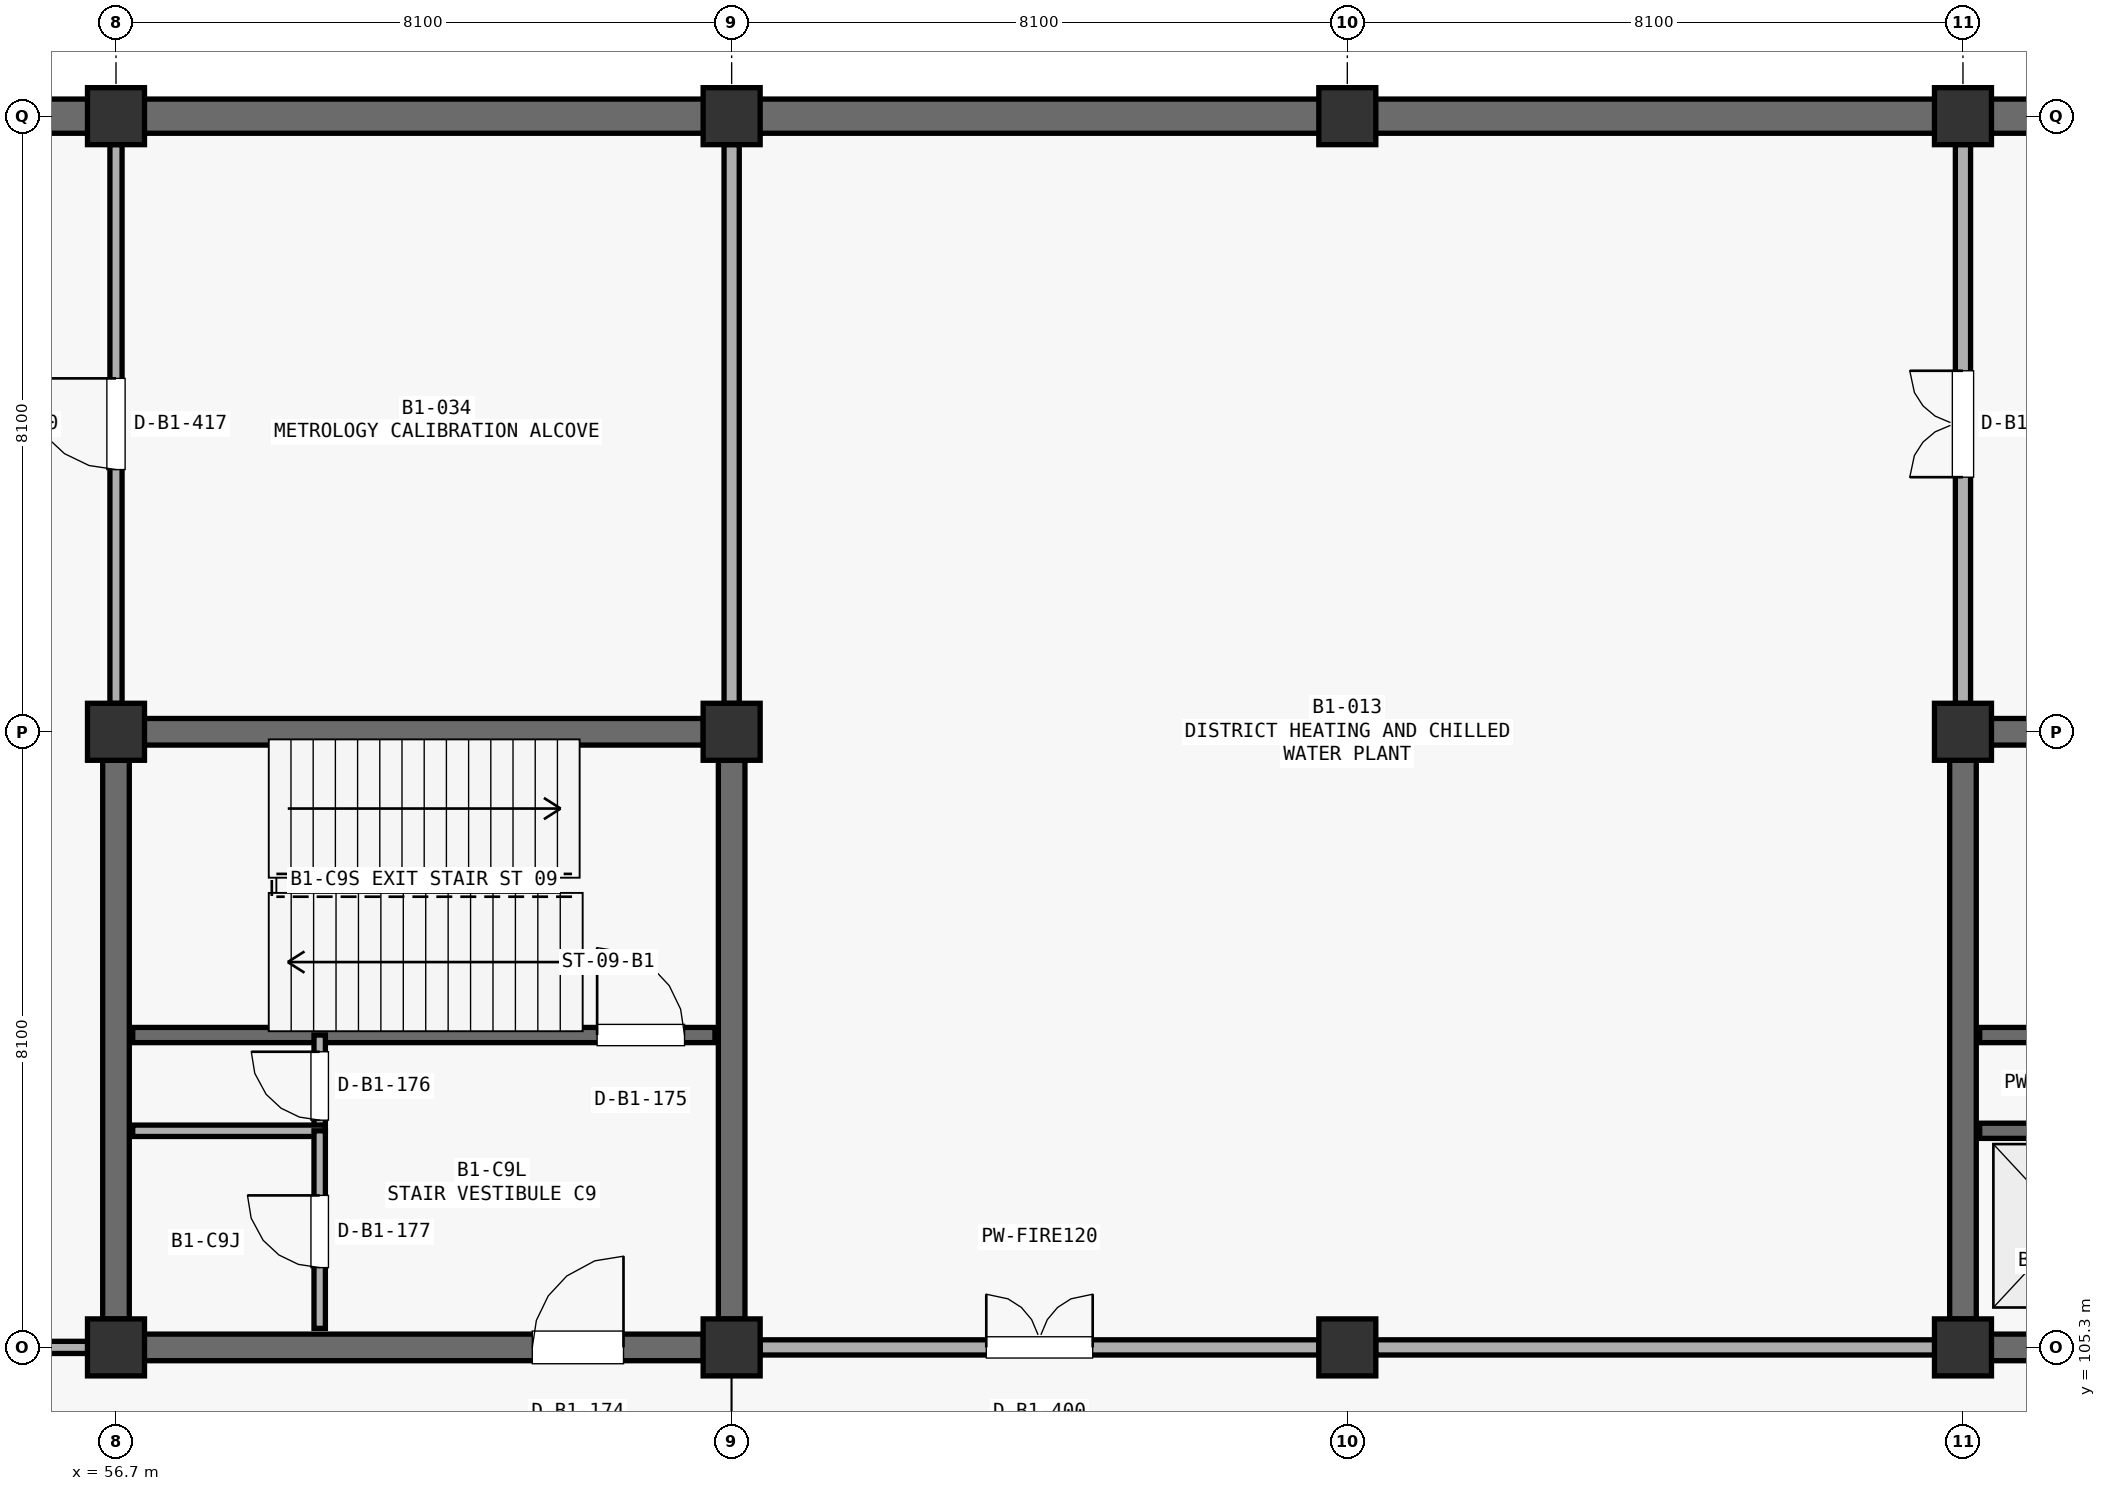
"""IFC4 building model, lengths in metres.
Left out: names, types, materials, properties, quantities, classifications, styles, units other than length and angle.
Written with IfcOpenShell. Run it as: python <this file> out.ifc"""

import sys

from ifc_helpers import new_model, si_unit, direction, frame, frame_2d, origin, origin_2d, place, context, subcontext, project, spatial, rectangle, extrude, element, fill, save


model = new_model("IFC4")
c1 = context("Model", 3, precision=1e-05, world=origin(), true_north=direction((0.0, 1.0)))
c2 = subcontext(c1, "Body", "Model", "MODEL_VIEW")
j1 = project(units=[si_unit("LENGTHUNIT", "METRE"), si_unit("PLANEANGLEUNIT", "RADIAN")], contexts=[c1])
p1 = place(None, origin())
s1 = spatial("IfcSite", under=j1, at=p1, CompositionType="ELEMENT")
p2 = place(p1, origin())
s2 = spatial("IfcBuilding", under=s1, at=p2, CompositionType="ELEMENT")
p3 = place(p2, frame((0.0, 0.0, -5.1)))
s3 = spatial("IfcBuildingStorey", under=s2, at=p3, CompositionType="ELEMENT", Elevation=-5.1)
for number, where, z_axis, x_axis in (
    (1, (56.7, 105.3, 0.0), (0.0, 0.0, 1.0), (1.0, 0.0, 0.0)),
    (2, (56.7, 113.4, 0.0), (0.0, 0.0, 1.0), (1.0, 0.0, 0.0)),
    (3, (56.7, 121.5, 0.0), (0.0, 0.0, 1.0), (1.0, 0.0, 0.0)),
    (4, (64.8, 105.3, 0.0), (0.0, 0.0, 1.0), (1.0, 0.0, 0.0)),
    (5, (64.8, 113.4, 0.0), (0.0, 0.0, 1.0), (1.0, 0.0, 0.0)),
    (6, (64.8, 121.5, 0.0), (0.0, 0.0, 1.0), (1.0, 0.0, 0.0)),
    (7, (72.9, 105.3, 0.0), (0.0, 0.0, 1.0), (1.0, 0.0, 0.0)),
    (8, (72.9, 113.4, 0.0), (0.0, 0.0, 1.0), (1.0, 0.0, 0.0)),
    (9, (72.9, 121.5, 0.0), (0.0, 0.0, 1.0), (1.0, 0.0, 0.0)),
    (10, (81.0, 105.3, 0.0), (0.0, 0.0, 1.0), (1.0, 0.0, 0.0)),
    (11, (81.0, 113.4, 0.0), (0.0, 0.0, 1.0), (1.0, 0.0, 0.0)),
    (12, (81.0, 121.5, 0.0), (0.0, 0.0, 1.0), (1.0, 0.0, 0.0)),
):
    element("IfcColumn", number, at=place(p3, frame(where, z_axis=z_axis, x_axis=x_axis)), inside=s3, PredefinedType="COLUMN", context=c2, shape_type="SweptSolid", body=[
        extrude(rectangle(XDim=0.75, YDim=0.75, at=origin_2d()), origin(), (0.0, 0.0, 1.0), 5.1),
    ])
p4 = place(p3, frame((48.96, 121.5, 0.0), z_axis=(0.0, 0.0, 1.0), x_axis=(1.0, 0.0, 0.0)))
e13 = element("IfcWall", 13, at=p4, inside=s3, PredefinedType="SOLIDWALL", context=c2, shape_type="SweptSolid", body=[
    extrude(rectangle(XDim=7.38, YDim=0.45, at=frame_2d((3.69, 0.0))), origin(), (0.0, 0.0, 1.0), 4.365),
])
p5 = place(p3, frame((57.06, 121.5, 0.0), z_axis=(0.0, 0.0, 1.0), x_axis=(1.0, 0.0, 0.0)))
e14 = element("IfcWall", 14, at=p5, inside=s3, PredefinedType="SOLIDWALL", context=c2, shape_type="SweptSolid", body=[
    extrude(rectangle(XDim=7.38, YDim=0.45, at=frame_2d((3.69, 0.0))), origin(), (0.0, 0.0, 1.0), 4.18),
])
p6 = place(p3, frame((65.16, 121.5, 0.0), z_axis=(0.0, 0.0, 1.0), x_axis=(1.0, 0.0, 0.0)))
e15 = element("IfcWall", 15, at=p6, inside=s3, PredefinedType="SOLIDWALL", context=c2, shape_type="SweptSolid", body=[
    extrude(rectangle(XDim=7.38, YDim=0.45, at=frame_2d((3.69, 0.0))), origin(), (0.0, 0.0, 1.0), 3.93),
])
p7 = place(p3, frame((73.26, 121.5, 0.0), z_axis=(0.0, 0.0, 1.0), x_axis=(1.0, 0.0, 0.0)))
e16 = element("IfcWall", 16, at=p7, inside=s3, PredefinedType="SOLIDWALL", context=c2, shape_type="SweptSolid", body=[
    extrude(rectangle(XDim=7.38, YDim=0.45, at=frame_2d((3.69, 0.0))), origin(), (0.0, 0.0, 1.0), 4.365),
])
p8 = place(p3, frame((81.36, 121.5, 0.0), z_axis=(0.0, 0.0, 1.0), x_axis=(1.0, 0.0, 0.0)))
e17 = element("IfcWall", 17, at=p8, inside=s3, PredefinedType="SOLIDWALL", context=c2, shape_type="SweptSolid", body=[
    extrude(rectangle(XDim=7.38, YDim=0.45, at=frame_2d((3.69, 0.0))), origin(), (0.0, 0.0, 1.0), 4.03),
])
for number, where, z_axis, x_axis in (
    (18, (81.373, 113.4, 0.0), (0.0, 0.0, 1.0), (1.0, 0.0, 0.0)),
    (19, (81.0, 105.673, 0.0), (0.0, 0.0, 1.0), (0.0, 1.0, 0.0)),
):
    element("IfcWall", number, at=place(p3, frame(where, z_axis=z_axis, x_axis=x_axis)), inside=s3, PredefinedType="SHEAR", context=c2, shape_type="SweptSolid", body=[
        extrude(rectangle(XDim=7.354, YDim=0.35, at=frame_2d((3.677, 0.0))), origin(), (0.0, 0.0, 1.0), 4.782),
    ])
p9 = place(p3, frame((81.373, 105.3, 0.0), z_axis=(0.0, 0.0, 1.0), x_axis=(1.0, 0.0, 0.0)))
e20 = element("IfcWall", 20, at=p9, inside=s3, PredefinedType="SHEAR", context=c2, shape_type="SweptSolid", body=[
    extrude(rectangle(XDim=7.354, YDim=0.35, at=frame_2d((3.677, 0.0))), origin(), (0.0, 0.0, 1.0), 4.782),
])
p10 = place(p9, frame((5.104, 0.0, 0.0)))
e21 = element("IfcOpeningElement", 21, at=p10, cuts=e20, PredefinedType="OPENING", context=c2, shape_type="SweptSolid", body=[
    extrude(rectangle(XDim=1.2, YDim=2.2, at=frame_2d((0.6, 1.1))), frame((0.0, 0.185, 0.0), z_axis=(0.0, -1.0, 0.0), x_axis=(1.0, 0.0, 0.0)), (0.0, 0.0, 1.0), 0.37),
])
p11 = place(p3, frame((81.22, 109.41, 0.0), z_axis=(0.0, 0.0, 1.0), x_axis=(1.0, 0.0, 0.0)))
e22 = element("IfcWall", 22, at=p11, inside=s3, PredefinedType="SHEAR", context=c2, shape_type="SweptSolid", body=[
    extrude(rectangle(XDim=7.66, YDim=0.2, at=frame_2d((3.83, 0.0))), origin(), (0.0, 0.0, 1.0), 4.782),
])
p12 = place(p11, frame((6.11, 0.0, 0.0)))
e23 = element("IfcOpeningElement", 23, at=p12, cuts=e22, PredefinedType="OPENING", context=c2, shape_type="SweptSolid", body=[
    extrude(rectangle(XDim=1.15, YDim=2.2, at=frame_2d((0.575, 1.1))), frame((0.0, 0.11, 0.0), z_axis=(0.0, -1.0, 0.0), x_axis=(1.0, 0.0, 0.0)), (0.0, 0.0, 1.0), 0.22),
])
p13 = place(p3, frame((81.22, 108.15, 0.0), z_axis=(0.0, 0.0, 1.0), x_axis=(1.0, 0.0, 0.0)))
e24 = element("IfcWall", 24, at=p13, inside=s3, PredefinedType="SHEAR", context=c2, shape_type="SweptSolid", body=[
    extrude(rectangle(XDim=2.56, YDim=0.2, at=frame_2d((1.28, 0.0))), origin(), (0.0, 0.0, 1.0), 4.782),
])
for number, where, z_axis, x_axis in (
    (25, (57.073, 113.4, 0.0), (0.0, 0.0, 1.0), (1.0, 0.0, 0.0)),
    (26, (56.7, 105.673, 0.0), (0.0, 0.0, 1.0), (0.0, 1.0, 0.0)),
    (27, (64.8, 105.673, 0.0), (0.0, 0.0, 1.0), (0.0, 1.0, 0.0)),
):
    element("IfcWall", number, at=place(p3, frame(where, z_axis=z_axis, x_axis=x_axis)), inside=s3, PredefinedType="SHEAR", context=c2, shape_type="SweptSolid", body=[
        extrude(rectangle(XDim=7.354, YDim=0.35, at=frame_2d((3.677, 0.0))), origin(), (0.0, 0.0, 1.0), 4.782),
    ])
p14 = place(p3, frame((57.073, 105.3, 0.0), z_axis=(0.0, 0.0, 1.0), x_axis=(1.0, 0.0, 0.0)))
e28 = element("IfcWall", 28, at=p14, inside=s3, PredefinedType="SHEAR", context=c2, shape_type="SweptSolid", body=[
    extrude(rectangle(XDim=7.354, YDim=0.35, at=frame_2d((3.677, 0.0))), origin(), (0.0, 0.0, 1.0), 4.782),
])
p15 = place(p14, frame((5.104, 0.0, 0.0)))
e29 = element("IfcOpeningElement", 29, at=p15, cuts=e28, PredefinedType="OPENING", context=c2, shape_type="SweptSolid", body=[
    extrude(rectangle(XDim=1.2, YDim=2.2, at=frame_2d((0.6, 1.1))), frame((0.0, 0.185, 0.0), z_axis=(0.0, -1.0, 0.0), x_axis=(1.0, 0.0, 0.0)), (0.0, 0.0, 1.0), 0.37),
])
p16 = place(p3, frame((56.92, 109.41, 0.0), z_axis=(0.0, 0.0, 1.0), x_axis=(1.0, 0.0, 0.0)))
e30 = element("IfcWall", 30, at=p16, inside=s3, PredefinedType="SHEAR", context=c2, shape_type="SweptSolid", body=[
    extrude(rectangle(XDim=7.66, YDim=0.2, at=frame_2d((3.83, 0.0))), origin(), (0.0, 0.0, 1.0), 4.782),
])
p17 = place(p16, frame((6.11, 0.0, 0.0)))
e31 = element("IfcOpeningElement", 31, at=p17, cuts=e30, PredefinedType="OPENING", context=c2, shape_type="SweptSolid", body=[
    extrude(rectangle(XDim=1.15, YDim=2.2, at=frame_2d((0.575, 1.1))), frame((0.0, 0.11, 0.0), z_axis=(0.0, -1.0, 0.0), x_axis=(1.0, 0.0, 0.0)), (0.0, 0.0, 1.0), 0.22),
])
p18 = place(p3, frame((59.38, 108.15, 0.0), z_axis=(0.0, 0.0, 1.0), x_axis=(0.0, 1.0, 0.0)))
e32 = element("IfcWall", 32, at=p18, inside=s3, PredefinedType="PARTITIONING", context=c2, shape_type="SweptSolid", body=[
    extrude(rectangle(XDim=1.26, YDim=0.15, at=frame_2d((0.63, 0.0))), origin(), (0.0, 0.0, 1.0), 4.782),
])
p19 = place(p18, frame((0.14, 0.0, 0.0)))
e33 = element("IfcOpeningElement", 33, at=p19, cuts=e32, PredefinedType="OPENING", context=c2, shape_type="SweptSolid", body=[
    extrude(rectangle(XDim=0.9, YDim=2.15, at=frame_2d((0.45, 1.075))), frame((0.0, 0.085, 0.0), z_axis=(0.0, -1.0, 0.0), x_axis=(1.0, 0.0, 0.0)), (0.0, 0.0, 1.0), 0.17),
])
p20 = place(p3, frame((56.92, 108.15, 0.0), z_axis=(0.0, 0.0, 1.0), x_axis=(1.0, 0.0, 0.0)))
e34 = element("IfcWall", 34, at=p20, inside=s3, PredefinedType="PARTITIONING", context=c2, shape_type="SweptSolid", body=[
    extrude(rectangle(XDim=2.53, YDim=0.15, at=frame_2d((1.265, 0.0))), origin(), (0.0, 0.0, 1.0), 4.782),
])
p21 = place(p3, frame((59.38, 105.55, 0.0), z_axis=(0.0, 0.0, 1.0), x_axis=(0.0, 1.0, 0.0)))
e35 = element("IfcWall", 35, at=p21, inside=s3, PredefinedType="PARTITIONING", context=c2, shape_type="SweptSolid", body=[
    extrude(rectangle(XDim=2.6, YDim=0.15, at=frame_2d((1.3, 0.0))), origin(), (0.0, 0.0, 1.0), 4.782),
])
p22 = place(p21, frame((0.8, 0.0, 0.0)))
e36 = element("IfcOpeningElement", 36, at=p22, cuts=e35, PredefinedType="OPENING", context=c2, shape_type="SweptSolid", body=[
    extrude(rectangle(XDim=0.95, YDim=2.15, at=frame_2d((0.475, 1.075))), frame((0.0, 0.085, 0.0), z_axis=(0.0, -1.0, 0.0), x_axis=(1.0, 0.0, 0.0)), (0.0, 0.0, 1.0), 0.17),
])
p23 = place(p3, frame((48.973, 105.3, 0.0), z_axis=(0.0, 0.0, 1.0), x_axis=(1.0, 0.0, 0.0)))
e37 = element("IfcWall", 37, at=p23, inside=s3, PredefinedType="PARTITIONING", context=c2, shape_type="SweptSolid", body=[
    extrude(rectangle(XDim=7.354, YDim=0.16, at=frame_2d((3.677, 0.0))), origin(), (0.0, 0.0, 1.0), 3.832),
])
p24 = place(p3, frame((56.7, 113.773, 0.0), z_axis=(0.0, 0.0, 1.0), x_axis=(0.0, 1.0, 0.0)))
e38 = element("IfcWall", 38, at=p24, inside=s3, PredefinedType="PARTITIONING", context=c2, shape_type="SweptSolid", body=[
    extrude(rectangle(XDim=7.354, YDim=0.16, at=frame_2d((3.677, 0.0))), origin(), (0.0, 0.0, 1.0), 3.932),
])
p25 = place(p24, frame((3.077, 0.0, 0.0)))
e39 = element("IfcOpeningElement", 39, at=p25, cuts=e38, PredefinedType="OPENING", context=c2, shape_type="SweptSolid", body=[
    extrude(rectangle(XDim=1.2, YDim=2.2, at=frame_2d((0.6, 1.1))), frame((0.0, 0.09, 0.0), z_axis=(0.0, -1.0, 0.0), x_axis=(1.0, 0.0, 0.0)), (0.0, 0.0, 1.0), 0.18),
])
p26 = place(p3, frame((65.173, 105.3, 0.0), z_axis=(0.0, 0.0, 1.0), x_axis=(1.0, 0.0, 0.0)))
e40 = element("IfcWall", 40, at=p26, inside=s3, PredefinedType="PARTITIONING", context=c2, shape_type="SweptSolid", body=[
    extrude(rectangle(XDim=7.354, YDim=0.2, at=frame_2d((3.677, 0.0))), origin(), (0.0, 0.0, 1.0), 4.132),
])
p27 = place(p26, frame((2.977, 0.0, 0.0)))
e41 = element("IfcOpeningElement", 41, at=p27, cuts=e40, PredefinedType="OPENING", context=c2, shape_type="SweptSolid", body=[
    extrude(rectangle(XDim=1.4, YDim=2.2, at=frame_2d((0.7, 1.1))), frame((0.0, 0.11, 0.0), z_axis=(0.0, -1.0, 0.0), x_axis=(1.0, 0.0, 0.0)), (0.0, 0.0, 1.0), 0.22),
])
p28 = place(p3, frame((73.273, 105.3, 0.0), z_axis=(0.0, 0.0, 1.0), x_axis=(1.0, 0.0, 0.0)))
e42 = element("IfcWall", 42, at=p28, inside=s3, PredefinedType="PARTITIONING", context=c2, shape_type="SweptSolid", body=[
    extrude(rectangle(XDim=7.354, YDim=0.2, at=frame_2d((3.677, 0.0))), origin(), (0.0, 0.0, 1.0), 4.182),
])
p29 = place(p3, frame((81.0, 113.773, 0.0), z_axis=(0.0, 0.0, 1.0), x_axis=(0.0, 1.0, 0.0)))
e43 = element("IfcWall", 43, at=p29, inside=s3, PredefinedType="PARTITIONING", context=c2, shape_type="SweptSolid", body=[
    extrude(rectangle(XDim=7.354, YDim=0.2, at=frame_2d((3.677, 0.0))), origin(), (0.0, 0.0, 1.0), 3.832),
])
p30 = place(p29, frame((2.977, 0.0, 0.0)))
e44 = element("IfcOpeningElement", 44, at=p30, cuts=e43, PredefinedType="OPENING", context=c2, shape_type="SweptSolid", body=[
    extrude(rectangle(XDim=1.4, YDim=2.2, at=frame_2d((0.7, 1.1))), frame((0.0, 0.11, 0.0), z_axis=(0.0, -1.0, 0.0), x_axis=(1.0, 0.0, 0.0)), (0.0, 0.0, 1.0), 0.22),
])
p31 = place(p3, frame((64.8, 113.773, 0.0), z_axis=(0.0, 0.0, 1.0), x_axis=(0.0, 1.0, 0.0)))
e45 = element("IfcWall", 45, at=p31, inside=s3, PredefinedType="PARTITIONING", context=c2, shape_type="SweptSolid", body=[
    extrude(rectangle(XDim=7.354, YDim=0.2, at=frame_2d((3.677, 0.0))), origin(), (0.0, 0.0, 1.0), 4.032),
])
p32 = place(p15, origin())
e46 = element("IfcDoor", 46, at=p32, inside=s3, OperationType="SINGLE_SWING_RIGHT", PredefinedType="DOOR", context=c2, shape_type="SweptSolid", body=[
    extrude(rectangle(XDim=1.2, YDim=2.2, at=frame_2d((0.6, 1.1))), frame((0.0, 0.025, 0.0), z_axis=(0.0, -1.0, 0.0), x_axis=(1.0, 0.0, 0.0)), (0.0, 0.0, 1.0), 0.05),
])
fill(e29, e46)
p33 = place(p17, origin())
e47 = element("IfcDoor", 47, at=p33, inside=s3, OperationType="SINGLE_SWING_LEFT", PredefinedType="DOOR", context=c2, shape_type="SweptSolid", body=[
    extrude(rectangle(XDim=1.15, YDim=2.2, at=frame_2d((0.575, 1.1))), frame((0.0, 0.025, 0.0), z_axis=(0.0, -1.0, 0.0), x_axis=(1.0, 0.0, 0.0)), (0.0, 0.0, 1.0), 0.05),
])
fill(e31, e47)
p34 = place(p19, origin())
e48 = element("IfcDoor", 48, at=p34, inside=s3, OperationType="SINGLE_SWING_RIGHT", PredefinedType="DOOR", context=c2, shape_type="SweptSolid", body=[
    extrude(rectangle(XDim=0.9, YDim=2.15, at=frame_2d((0.45, 1.075))), frame((0.0, 0.025, 0.0), z_axis=(0.0, -1.0, 0.0), x_axis=(1.0, 0.0, 0.0)), (0.0, 0.0, 1.0), 0.05),
])
fill(e33, e48)
p35 = place(p22, origin())
e49 = element("IfcDoor", 49, at=p35, inside=s3, OperationType="SINGLE_SWING_RIGHT", PredefinedType="DOOR", context=c2, shape_type="SweptSolid", body=[
    extrude(rectangle(XDim=0.95, YDim=2.15, at=frame_2d((0.475, 1.075))), frame((0.0, 0.025, 0.0), z_axis=(0.0, -1.0, 0.0), x_axis=(1.0, 0.0, 0.0)), (0.0, 0.0, 1.0), 0.05),
])
fill(e36, e49)
p36 = place(p27, origin())
e50 = element("IfcDoor", 50, at=p36, inside=s3, OperationType="DOUBLE_SWING_LEFT", PredefinedType="DOOR", context=c2, shape_type="SweptSolid", body=[
    extrude(rectangle(XDim=1.4, YDim=2.2, at=frame_2d((0.7, 1.1))), frame((0.0, 0.025, 0.0), z_axis=(0.0, -1.0, 0.0), x_axis=(1.0, 0.0, 0.0)), (0.0, 0.0, 1.0), 0.05),
])
fill(e41, e50)
p37 = place(p25, origin())
e51 = element("IfcDoor", 51, at=p37, inside=s3, OperationType="SINGLE_SWING_RIGHT", PredefinedType="DOOR", context=c2, shape_type="SweptSolid", body=[
    extrude(rectangle(XDim=1.2, YDim=2.2, at=frame_2d((0.6, 1.1))), frame((0.0, 0.025, 0.0), z_axis=(0.0, -1.0, 0.0), x_axis=(1.0, 0.0, 0.0)), (0.0, 0.0, 1.0), 0.05),
])
fill(e39, e51)
p38 = place(p30, origin())
e52 = element("IfcDoor", 52, at=p38, inside=s3, OperationType="DOUBLE_SWING_LEFT", PredefinedType="DOOR", context=c2, shape_type="SweptSolid", body=[
    extrude(rectangle(XDim=1.4, YDim=2.2, at=frame_2d((0.7, 1.1))), frame((0.0, 0.025, 0.0), z_axis=(0.0, -1.0, 0.0), x_axis=(1.0, 0.0, 0.0)), (0.0, 0.0, 1.0), 0.05),
])
fill(e44, e52)
save(model, sys.argv[1])
